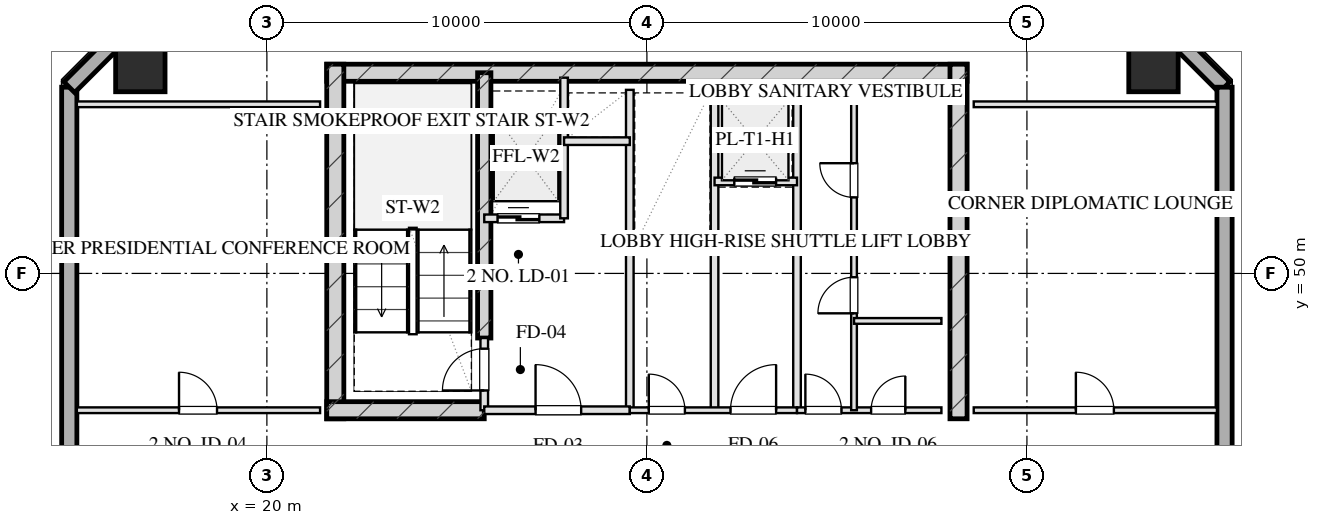
"""IFC4 building model, lengths in metres.
Left out: names, types, materials, properties, quantities, classifications, styles, units other than length and angle.
Written with IfcOpenShell. Run it as: python <this file> out.ifc"""

import sys

from ifc_helpers import new_model, si_unit, direction, frame, frame_2d, origin, origin_2d, place, context, subcontext, project, spatial, rectangle, hollow_rectangle, extrude, element, fill, save


model = new_model("IFC4")
c1 = context("Model", 3, precision=1e-05, world=origin(), true_north=direction((0.0, 1.0)))
c2 = subcontext(c1, "Body", "Model", "MODEL_VIEW")
j1 = project(units=[si_unit("LENGTHUNIT", "METRE"), si_unit("PLANEANGLEUNIT", "RADIAN")], contexts=[c1])
p1 = place(None, origin())
s1 = spatial("IfcSite", under=j1, at=p1, CompositionType="ELEMENT")
p2 = place(p1, origin())
s2 = spatial("IfcBuilding", under=s1, at=p2, CompositionType="ELEMENT")
p3 = place(p2, frame((0.0, 0.0, 237.6)))
s3 = spatial("IfcBuildingStorey", under=s2, at=p3, CompositionType="ELEMENT", Elevation=237.6)
p4 = place(p3, frame((21.575, 55.28, 0.0), z_axis=(0.0, 0.0, 1.0), x_axis=(1.0, 0.0, 0.0)))
e1 = element("IfcWall", 1, at=p4, inside=s3, PredefinedType="SHEAR", context=c2, shape_type="SweptSolid", body=[
    extrude(rectangle(XDim=16.85, YDim=0.45, at=frame_2d((8.425, 0.0))), origin(), (0.0, 0.0, 1.0), 3.2),
])
for number, where, z_axis, x_axis in (
    (2, (21.8, 46.175, 0.0), (0.0, 0.0, 1.0), (0.0, 1.0, 0.0)),
    (3, (38.2, 46.175, 0.0), (0.0, 0.0, 1.0), (0.0, 1.0, 0.0)),
):
    element("IfcWall", number, at=place(p3, frame(where, z_axis=z_axis, x_axis=x_axis)), inside=s3, PredefinedType="SHEAR", context=c2, shape_type="SweptSolid", body=[
        extrude(rectangle(XDim=9.33, YDim=0.45, at=frame_2d((4.665, 0.0))), origin(), (0.0, 0.0, 1.0), 3.2),
    ])
p5 = place(p3, frame((25.72, 48.3, 0.0), z_axis=(0.0, 0.0, 1.0), x_axis=(0.0, 1.0, 0.0)))
e4 = element("IfcWall", 4, at=p5, inside=s3, PredefinedType="SHEAR", context=c2, shape_type="SweptSolid", body=[
    extrude(rectangle(XDim=6.98, YDim=0.35, at=frame_2d((3.49, 0.0))), origin(), (0.0, 0.0, 1.0), 3.2),
])
p6 = place(p3, frame((21.575, 46.4, 0.0), z_axis=(0.0, 0.0, 1.0), x_axis=(1.0, 0.0, 0.0)))
e5 = element("IfcWall", 5, at=p6, inside=s3, PredefinedType="SHEAR", context=c2, shape_type="SweptSolid", body=[
    extrude(rectangle(XDim=4.145, YDim=0.45, at=frame_2d((2.073, 0.0))), origin(), (0.0, 0.0, 1.0), 3.2),
])
for number, where, z_axis, x_axis in (
    (6, (43.33, 55.43, 0.0), (0.0, 0.0, 1.0), (1.0, 0.0, 0.0)),
    (7, (16.67, 55.43, 0.0), (0.0, 0.0, 1.0), (1.0, 0.0, 0.0)),
):
    element("IfcColumn", number, at=place(p3, frame(where, z_axis=z_axis, x_axis=x_axis)), inside=s3, PredefinedType="COLUMN", context=c2, shape_type="SweptSolid", body=[
        extrude(hollow_rectangle(XDim=1.3, YDim=1.3, WallThickness=0.045, at=origin_2d()), origin(), (0.0, 0.0, 1.0), 3.201),
    ])
p7 = place(p3, frame((14.8, 13.1, 0.0), z_axis=(0.0, 0.0, 1.0), x_axis=(0.0, 1.0, 0.0)))
e8 = element("IfcWall", 8, at=p7, inside=s3, PredefinedType="SOLIDWALL", context=c2, shape_type="SweptSolid", body=[
    extrude(rectangle(XDim=41.8, YDim=0.4, at=frame_2d((20.9, 0.0))), origin(), (0.0, 0.0, 1.0), 2.36),
])
p8 = place(p7, frame((22.525, 0.0, 0.75)))
e9 = element("IfcOpeningElement", 9, at=p8, cuts=e8, PredefinedType="OPENING", context=c2, shape_type="SweptSolid", body=[
    extrude(rectangle(XDim=1.95, YDim=1.21, at=frame_2d((0.975, 0.605))), frame((0.0, 0.21, 0.0), z_axis=(0.0, -1.0, 0.0), x_axis=(1.0, 0.0, 0.0)), (0.0, 0.0, 1.0), 0.42),
])
p9 = place(p7, frame((26.325, 0.0, 0.75)))
e10 = element("IfcOpeningElement", 10, at=p9, cuts=e8, PredefinedType="OPENING", context=c2, shape_type="SweptSolid", body=[
    extrude(rectangle(XDim=1.95, YDim=1.21, at=frame_2d((0.975, 0.605))), frame((0.0, 0.21, 0.0), z_axis=(0.0, -1.0, 0.0), x_axis=(1.0, 0.0, 0.0)), (0.0, 0.0, 1.0), 0.42),
])
p10 = place(p7, frame((17.5, 0.0, 0.0)))
e11 = element("IfcOpeningElement", 11, at=p10, cuts=e8, PredefinedType="OPENING", context=c2, shape_type="SweptSolid", body=[
    extrude(rectangle(XDim=1.1, YDim=2.15, at=frame_2d((0.55, 1.075))), frame((0.0, 0.21, 0.0), z_axis=(0.0, -1.0, 0.0), x_axis=(1.0, 0.0, 0.0)), (0.0, 0.0, 1.0), 0.42),
])
for number, where, z_axis, x_axis in (
    (12, (14.8, 54.9, 0.0), (0.0, 0.0, 1.0), (0.707, 0.707, 0.0)),
    (13, (42.8, 57.3, 0.0), (0.0, 0.0, 1.0), (0.707, -0.707, 0.0)),
):
    element("IfcWall", number, at=place(p3, frame(where, z_axis=z_axis, x_axis=x_axis)), inside=s3, PredefinedType="SOLIDWALL", context=c2, shape_type="SweptSolid", body=[
        extrude(rectangle(XDim=3.394, YDim=0.4, at=frame_2d((1.697, 0.0))), origin(), (0.0, 0.0, 1.0), 2.36),
    ])
p11 = place(p3, frame((45.2, 54.9, 0.0), z_axis=(0.0, 0.0, 1.0), x_axis=(0.0, -1.0, 0.0)))
e14 = element("IfcWall", 14, at=p11, inside=s3, PredefinedType="SOLIDWALL", context=c2, shape_type="SweptSolid", body=[
    extrude(rectangle(XDim=41.8, YDim=0.4, at=frame_2d((20.9, 0.0))), origin(), (0.0, 0.0, 1.0), 2.36),
])
p12 = place(p11, frame((17.325, 0.0, 0.75)))
e15 = element("IfcOpeningElement", 15, at=p12, cuts=e14, PredefinedType="OPENING", context=c2, shape_type="SweptSolid", body=[
    extrude(rectangle(XDim=1.95, YDim=1.21, at=frame_2d((0.975, 0.605))), frame((0.0, 0.21, 0.0), z_axis=(0.0, -1.0, 0.0), x_axis=(1.0, 0.0, 0.0)), (0.0, 0.0, 1.0), 0.42),
])
p13 = place(p11, frame((13.525, 0.0, 0.75)))
e16 = element("IfcOpeningElement", 16, at=p13, cuts=e14, PredefinedType="OPENING", context=c2, shape_type="SweptSolid", body=[
    extrude(rectangle(XDim=1.95, YDim=1.21, at=frame_2d((0.975, 0.605))), frame((0.0, 0.21, 0.0), z_axis=(0.0, -1.0, 0.0), x_axis=(1.0, 0.0, 0.0)), (0.0, 0.0, 1.0), 0.42),
])
p14 = place(p11, frame((23.2, 0.0, 0.0)))
e17 = element("IfcOpeningElement", 17, at=p14, cuts=e14, PredefinedType="OPENING", context=c2, shape_type="SweptSolid", body=[
    extrude(rectangle(XDim=1.1, YDim=2.15, at=frame_2d((0.55, 1.075))), frame((0.0, 0.21, 0.0), z_axis=(0.0, -1.0, 0.0), x_axis=(1.0, 0.0, 0.0)), (0.0, 0.0, 1.0), 0.42),
])
p15 = place(p3, frame((25.72, 46.4, 0.0), z_axis=(0.0, 0.0, 1.0), x_axis=(0.0, 1.0, 0.0)))
e18 = element("IfcWall", 18, at=p15, inside=s3, PredefinedType="PARTITIONING", context=c2, shape_type="SweptSolid", body=[
    extrude(rectangle(XDim=1.9, YDim=0.2, at=frame_2d((0.95, 0.0))), origin(), (0.0, 0.0, 1.0), 2.925),
])
p16 = place(p15, frame((0.52, 0.0, 0.0)))
e19 = element("IfcOpeningElement", 19, at=p16, cuts=e18, PredefinedType="OPENING", context=c2, shape_type="SweptSolid", body=[
    extrude(rectangle(XDim=1.1, YDim=2.05, at=frame_2d((0.55, 1.025))), frame((0.0, 0.11, 0.0), z_axis=(0.0, -1.0, 0.0), x_axis=(1.0, 0.0, 0.0)), (0.0, 0.0, 1.0), 0.22),
])
p17 = place(p3, frame((29.55, 46.4, 0.0), z_axis=(0.0, 0.0, 1.0), x_axis=(0.0, 1.0, 0.0)))
e20 = element("IfcWall", 20, at=p17, inside=s3, PredefinedType="PARTITIONING", context=c2, shape_type="SweptSolid", body=[
    extrude(rectangle(XDim=8.43, YDim=0.2, at=frame_2d((4.215, 0.0))), origin(), (0.0, 0.0, 1.0), 2.925),
])
p18 = place(p3, frame((25.72, 46.4, 0.0), z_axis=(0.0, 0.0, 1.0), x_axis=(1.0, 0.0, 0.0)))
e21 = element("IfcWall", 21, at=p18, inside=s3, PredefinedType="PARTITIONING", context=c2, shape_type="SweptSolid", body=[
    extrude(rectangle(XDim=3.83, YDim=0.2, at=frame_2d((1.915, 0.0))), origin(), (0.0, 0.0, 1.0), 2.925),
])
p19 = place(p18, frame((1.35, 0.0, 0.0)))
e22 = element("IfcOpeningElement", 22, at=p19, cuts=e21, PredefinedType="OPENING", context=c2, shape_type="SweptSolid", body=[
    extrude(rectangle(XDim=1.2, YDim=2.05, at=frame_2d((0.6, 1.025))), frame((0.0, 0.11, 0.0), z_axis=(0.0, -1.0, 0.0), x_axis=(1.0, 0.0, 0.0)), (0.0, 0.0, 1.0), 0.22),
])
p20 = place(p3, frame((25.72, 51.45, 0.0), z_axis=(0.0, 0.0, 1.0), x_axis=(1.0, 0.0, 0.0)))
e23 = element("IfcWall", 23, at=p20, inside=s3, PredefinedType="PARTITIONING", context=c2, shape_type="SweptSolid", body=[
    extrude(rectangle(XDim=2.1, YDim=0.2, at=frame_2d((1.05, 0.0))), origin(), (0.0, 0.0, 1.0), 2.925),
])
p21 = place(p20, frame((0.35, 0.0, 0.0)))
e24 = element("IfcOpeningElement", 24, at=p21, cuts=e23, PredefinedType="OPENING", context=c2, shape_type="SweptSolid", body=[
    extrude(rectangle(XDim=1.1, YDim=2.05, at=frame_2d((0.55, 1.025))), frame((0.0, 0.11, 0.0), z_axis=(0.0, -1.0, 0.0), x_axis=(1.0, 0.0, 0.0)), (0.0, 0.0, 1.0), 0.22),
])
p22 = place(p3, frame((27.82, 51.45, 0.0), z_axis=(0.0, 0.0, 1.0), x_axis=(0.0, 1.0, 0.0)))
e25 = element("IfcWall", 25, at=p22, inside=s3, PredefinedType="PARTITIONING", context=c2, shape_type="SweptSolid", body=[
    extrude(rectangle(XDim=3.7, YDim=0.2, at=frame_2d((1.85, 0.0))), origin(), (0.0, 0.0, 1.0), 2.925),
])
p23 = place(p3, frame((27.82, 53.48, 0.0), z_axis=(0.0, 0.0, 1.0), x_axis=(1.0, 0.0, 0.0)))
e26 = element("IfcWall", 26, at=p23, inside=s3, PredefinedType="PARTITIONING", context=c2, shape_type="SweptSolid", body=[
    extrude(rectangle(XDim=1.73, YDim=0.2, at=frame_2d((0.865, 0.0))), origin(), (0.0, 0.0, 1.0), 2.925),
])
for number, where, z_axis, x_axis in (
    (27, (33.95, 46.4, 0.0), (0.0, 0.0, 1.0), (0.0, 1.0, 0.0)),
    (28, (31.78, 46.4, 0.0), (0.0, 0.0, 1.0), (0.0, 1.0, 0.0)),
):
    element("IfcWall", number, at=place(p3, frame(where, z_axis=z_axis, x_axis=x_axis)), inside=s3, PredefinedType="PARTITIONING", context=c2, shape_type="SweptSolid", body=[
        extrude(rectangle(XDim=8.43, YDim=0.2, at=frame_2d((4.215, 0.0))), origin(), (0.0, 0.0, 1.0), 2.925),
    ])
p24 = place(p3, frame((29.55, 46.4, 0.0), z_axis=(0.0, 0.0, 1.0), x_axis=(1.0, 0.0, 0.0)))
e29 = element("IfcWall", 29, at=p24, inside=s3, PredefinedType="PARTITIONING", context=c2, shape_type="SweptSolid", body=[
    extrude(rectangle(XDim=4.4, YDim=0.15, at=frame_2d((2.2, 0.0))), origin(), (0.0, 0.0, 1.0), 2.925),
])
p25 = place(p24, frame((0.5, 0.0, 0.0)))
e30 = element("IfcOpeningElement", 30, at=p25, cuts=e29, PredefinedType="OPENING", context=c2, shape_type="SweptSolid", body=[
    extrude(rectangle(XDim=0.95, YDim=2.05, at=frame_2d((0.475, 1.025))), frame((0.0, 0.085, 0.0), z_axis=(0.0, -1.0, 0.0), x_axis=(1.0, 0.0, 0.0)), (0.0, 0.0, 1.0), 0.17),
])
p26 = place(p24, frame((2.65, 0.0, 0.0)))
e31 = element("IfcOpeningElement", 31, at=p26, cuts=e29, PredefinedType="OPENING", context=c2, shape_type="SweptSolid", body=[
    extrude(rectangle(XDim=1.2, YDim=2.05, at=frame_2d((0.6, 1.025))), frame((0.0, 0.085, 0.0), z_axis=(0.0, -1.0, 0.0), x_axis=(1.0, 0.0, 0.0)), (0.0, 0.0, 1.0), 0.17),
])
p27 = place(p3, frame((29.55, 50.6, 0.0), z_axis=(0.0, 0.0, 1.0), x_axis=(1.0, 0.0, 0.0)))
e32 = element("IfcWall", 32, at=p27, inside=s3, PredefinedType="PARTITIONING", context=c2, shape_type="SweptSolid", body=[
    extrude(rectangle(XDim=2.23, YDim=0.15, at=frame_2d((1.115, 0.0))), origin(), (0.0, 0.0, 1.0), 2.925),
])
p28 = place(p3, frame((31.78, 52.42, 0.0), z_axis=(0.0, 0.0, 1.0), x_axis=(1.0, 0.0, 0.0)))
e33 = element("IfcWall", 33, at=p28, inside=s3, PredefinedType="PARTITIONING", context=c2, shape_type="SweptSolid", body=[
    extrude(rectangle(XDim=2.17, YDim=0.2, at=frame_2d((1.085, 0.0))), origin(), (0.0, 0.0, 1.0), 2.925),
])
p29 = place(p28, frame((0.52, 0.0, 0.0)))
e34 = element("IfcOpeningElement", 34, at=p29, cuts=e33, PredefinedType="OPENING", context=c2, shape_type="SweptSolid", body=[
    extrude(rectangle(XDim=1.1, YDim=2.05, at=frame_2d((0.55, 1.025))), frame((0.0, 0.11, 0.0), z_axis=(0.0, -1.0, 0.0), x_axis=(1.0, 0.0, 0.0)), (0.0, 0.0, 1.0), 0.22),
])
p30 = place(p3, frame((33.95, 46.4, 0.0), z_axis=(0.0, 0.0, 1.0), x_axis=(1.0, 0.0, 0.0)))
e35 = element("IfcWall", 35, at=p30, inside=s3, PredefinedType="PARTITIONING", context=c2, shape_type="SweptSolid", body=[
    extrude(rectangle(XDim=3.8, YDim=0.15, at=frame_2d((1.9, 0.0))), origin(), (0.0, 0.0, 1.0), 2.925),
])
p31 = place(p30, frame((0.22, 0.0, 0.0)))
e36 = element("IfcOpeningElement", 36, at=p31, cuts=e35, PredefinedType="OPENING", context=c2, shape_type="SweptSolid", body=[
    extrude(rectangle(XDim=0.95, YDim=2.05, at=frame_2d((0.475, 1.025))), frame((0.0, 0.085, 0.0), z_axis=(0.0, -1.0, 0.0), x_axis=(1.0, 0.0, 0.0)), (0.0, 0.0, 1.0), 0.17),
])
p32 = place(p30, frame((1.95, 0.0, 0.0)))
e37 = element("IfcOpeningElement", 37, at=p32, cuts=e35, PredefinedType="OPENING", context=c2, shape_type="SweptSolid", body=[
    extrude(rectangle(XDim=0.9, YDim=2.05, at=frame_2d((0.45, 1.025))), frame((0.0, 0.085, 0.0), z_axis=(0.0, -1.0, 0.0), x_axis=(1.0, 0.0, 0.0)), (0.0, 0.0, 1.0), 0.17),
])
p33 = place(p3, frame((35.45, 46.4, 0.0), z_axis=(0.0, 0.0, 1.0), x_axis=(0.0, 1.0, 0.0)))
e38 = element("IfcWall", 38, at=p33, inside=s3, PredefinedType="PARTITIONING", context=c2, shape_type="SweptSolid", body=[
    extrude(rectangle(XDim=8.43, YDim=0.15, at=frame_2d((4.215, 0.0))), origin(), (0.0, 0.0, 1.0), 2.515),
])
p34 = place(p33, frame((2.55, 0.0, 0.0)))
e39 = element("IfcOpeningElement", 39, at=p34, cuts=e38, PredefinedType="OPENING", context=c2, shape_type="SweptSolid", body=[
    extrude(rectangle(XDim=0.95, YDim=2.05, at=frame_2d((0.475, 1.025))), frame((0.0, 0.085, 0.0), z_axis=(0.0, -1.0, 0.0), x_axis=(1.0, 0.0, 0.0)), (0.0, 0.0, 1.0), 0.17),
])
p35 = place(p33, frame((5.6, 0.0, 0.0)))
e40 = element("IfcOpeningElement", 40, at=p35, cuts=e38, PredefinedType="OPENING", context=c2, shape_type="SweptSolid", body=[
    extrude(rectangle(XDim=0.9, YDim=2.05, at=frame_2d((0.45, 1.025))), frame((0.0, 0.085, 0.0), z_axis=(0.0, -1.0, 0.0), x_axis=(1.0, 0.0, 0.0)), (0.0, 0.0, 1.0), 0.17),
])
for number, where, z_axis, x_axis in (
    (41, (35.45, 50.8, 0.0), (0.0, 0.0, 1.0), (1.0, 0.0, 0.0)),
    (42, (35.45, 48.75, 0.0), (0.0, 0.0, 1.0), (1.0, 0.0, 0.0)),
):
    element("IfcWall", number, at=place(p3, frame(where, z_axis=z_axis, x_axis=x_axis)), inside=s3, PredefinedType="PARTITIONING", context=c2, shape_type="SweptSolid", body=[
        extrude(rectangle(XDim=2.3, YDim=0.15, at=frame_2d((1.15, 0.0))), origin(), (0.0, 0.0, 1.0), 2.925),
    ])
p36 = place(p3, frame((15.0, 54.45, 0.0), z_axis=(0.0, 0.0, 1.0), x_axis=(1.0, 0.0, 0.0)))
e43 = element("IfcWall", 43, at=p36, inside=s3, PredefinedType="PARTITIONING", context=c2, shape_type="SweptSolid", body=[
    extrude(rectangle(XDim=6.4, YDim=0.15, at=frame_2d((3.2, 0.0))), origin(), (0.0, 0.0, 1.0), 2.925),
])
p37 = place(p3, frame((15.0, 46.4, 0.0), z_axis=(0.0, 0.0, 1.0), x_axis=(1.0, 0.0, 0.0)))
e44 = element("IfcWall", 44, at=p37, inside=s3, PredefinedType="PARTITIONING", context=c2, shape_type="SweptSolid", body=[
    extrude(rectangle(XDim=6.4, YDim=0.15, at=frame_2d((3.2, 0.0))), origin(), (0.0, 0.0, 1.0), 2.925),
])
p38 = place(p37, frame((2.688, 0.0, 0.0)))
e45 = element("IfcOpeningElement", 45, at=p38, cuts=e44, PredefinedType="OPENING", context=c2, shape_type="SweptSolid", body=[
    extrude(rectangle(XDim=1.0, YDim=2.05, at=frame_2d((0.5, 1.025))), frame((0.0, 0.085, 0.0), z_axis=(0.0, -1.0, 0.0), x_axis=(1.0, 0.0, 0.0)), (0.0, 0.0, 1.0), 0.17),
])
p39 = place(p3, frame((38.6, 54.45, 0.0), z_axis=(0.0, 0.0, 1.0), x_axis=(1.0, 0.0, 0.0)))
e46 = element("IfcWall", 46, at=p39, inside=s3, PredefinedType="PARTITIONING", context=c2, shape_type="SweptSolid", body=[
    extrude(rectangle(XDim=6.4, YDim=0.15, at=frame_2d((3.2, 0.0))), origin(), (0.0, 0.0, 1.0), 2.925),
])
p40 = place(p3, frame((38.6, 46.4, 0.0), z_axis=(0.0, 0.0, 1.0), x_axis=(1.0, 0.0, 0.0)))
e47 = element("IfcWall", 47, at=p40, inside=s3, PredefinedType="PARTITIONING", context=c2, shape_type="SweptSolid", body=[
    extrude(rectangle(XDim=6.4, YDim=0.15, at=frame_2d((3.2, 0.0))), origin(), (0.0, 0.0, 1.0), 2.925),
])
p41 = place(p40, frame((2.688, 0.0, 0.0)))
e48 = element("IfcOpeningElement", 48, at=p41, cuts=e47, PredefinedType="OPENING", context=c2, shape_type="SweptSolid", body=[
    extrude(rectangle(XDim=1.0, YDim=2.05, at=frame_2d((0.5, 1.025))), frame((0.0, 0.085, 0.0), z_axis=(0.0, -1.0, 0.0), x_axis=(1.0, 0.0, 0.0)), (0.0, 0.0, 1.0), 0.17),
])
p42 = place(p16, origin())
e49 = element("IfcDoor", 49, at=p42, inside=s3, OperationType="SINGLE_SWING_LEFT", PredefinedType="DOOR", context=c2, shape_type="SweptSolid", body=[
    extrude(rectangle(XDim=1.1, YDim=2.05, at=frame_2d((0.55, 1.025))), frame((0.0, 0.025, 0.0), z_axis=(0.0, -1.0, 0.0), x_axis=(1.0, 0.0, 0.0)), (0.0, 0.0, 1.0), 0.05),
])
fill(e19, e49)
p43 = place(p19, origin())
e50 = element("IfcDoor", 50, at=p43, inside=s3, OperationType="SINGLE_SWING_LEFT", PredefinedType="DOOR", context=c2, shape_type="SweptSolid", body=[
    extrude(rectangle(XDim=1.2, YDim=2.05, at=frame_2d((0.6, 1.025))), frame((0.0, 0.025, 0.0), z_axis=(0.0, -1.0, 0.0), x_axis=(1.0, 0.0, 0.0)), (0.0, 0.0, 1.0), 0.05),
])
fill(e22, e50)
p44 = place(p21, origin())
e51 = element("IfcDoor", 51, at=p44, inside=s3, OperationType="DOUBLE_DOOR_SLIDING", PredefinedType="DOOR", context=c2, shape_type="SweptSolid", body=[
    extrude(rectangle(XDim=1.1, YDim=2.05, at=frame_2d((0.55, 1.025))), frame((0.0, 0.025, 0.0), z_axis=(0.0, -1.0, 0.0), x_axis=(1.0, 0.0, 0.0)), (0.0, 0.0, 1.0), 0.05),
])
fill(e24, e51)
p45 = place(p25, origin())
e52 = element("IfcDoor", 52, at=p45, inside=s3, OperationType="SINGLE_SWING_LEFT", PredefinedType="DOOR", context=c2, shape_type="SweptSolid", body=[
    extrude(rectangle(XDim=0.95, YDim=2.05, at=frame_2d((0.475, 1.025))), frame((0.0, 0.025, 0.0), z_axis=(0.0, -1.0, 0.0), x_axis=(1.0, 0.0, 0.0)), (0.0, 0.0, 1.0), 0.05),
])
fill(e30, e52)
p46 = place(p26, origin())
e53 = element("IfcDoor", 53, at=p46, inside=s3, OperationType="SINGLE_SWING_RIGHT", PredefinedType="DOOR", context=c2, shape_type="SweptSolid", body=[
    extrude(rectangle(XDim=1.2, YDim=2.05, at=frame_2d((0.6, 1.025))), frame((0.0, 0.025, 0.0), z_axis=(0.0, -1.0, 0.0), x_axis=(1.0, 0.0, 0.0)), (0.0, 0.0, 1.0), 0.05),
])
fill(e31, e53)
p47 = place(p29, origin())
e54 = element("IfcDoor", 54, at=p47, inside=s3, OperationType="DOUBLE_DOOR_SLIDING", PredefinedType="DOOR", context=c2, shape_type="SweptSolid", body=[
    extrude(rectangle(XDim=1.1, YDim=2.05, at=frame_2d((0.55, 1.025))), frame((0.0, 0.025, 0.0), z_axis=(0.0, -1.0, 0.0), x_axis=(1.0, 0.0, 0.0)), (0.0, 0.0, 1.0), 0.05),
])
fill(e34, e54)
p48 = place(p31, origin())
e55 = element("IfcDoor", 55, at=p48, inside=s3, OperationType="SINGLE_SWING_LEFT", PredefinedType="DOOR", context=c2, shape_type="SweptSolid", body=[
    extrude(rectangle(XDim=0.95, YDim=2.05, at=frame_2d((0.475, 1.025))), frame((0.0, 0.025, 0.0), z_axis=(0.0, -1.0, 0.0), x_axis=(1.0, 0.0, 0.0)), (0.0, 0.0, 1.0), 0.05),
])
fill(e36, e55)
p49 = place(p32, origin())
e56 = element("IfcDoor", 56, at=p49, inside=s3, OperationType="SINGLE_SWING_RIGHT", PredefinedType="DOOR", context=c2, shape_type="SweptSolid", body=[
    extrude(rectangle(XDim=0.9, YDim=2.05, at=frame_2d((0.45, 1.025))), frame((0.0, 0.025, 0.0), z_axis=(0.0, -1.0, 0.0), x_axis=(1.0, 0.0, 0.0)), (0.0, 0.0, 1.0), 0.05),
])
fill(e37, e56)
p50 = place(p34, origin())
e57 = element("IfcDoor", 57, at=p50, inside=s3, OperationType="SINGLE_SWING_LEFT", PredefinedType="DOOR", context=c2, shape_type="SweptSolid", body=[
    extrude(rectangle(XDim=0.95, YDim=2.05, at=frame_2d((0.475, 1.025))), frame((0.0, 0.025, 0.0), z_axis=(0.0, -1.0, 0.0), x_axis=(1.0, 0.0, 0.0)), (0.0, 0.0, 1.0), 0.05),
])
fill(e39, e57)
p51 = place(p35, origin())
e58 = element("IfcDoor", 58, at=p51, inside=s3, OperationType="SINGLE_SWING_RIGHT", PredefinedType="DOOR", context=c2, shape_type="SweptSolid", body=[
    extrude(rectangle(XDim=0.9, YDim=2.05, at=frame_2d((0.45, 1.025))), frame((0.0, 0.025, 0.0), z_axis=(0.0, -1.0, 0.0), x_axis=(1.0, 0.0, 0.0)), (0.0, 0.0, 1.0), 0.05),
])
fill(e40, e58)
p52 = place(p38, origin())
e59 = element("IfcDoor", 59, at=p52, inside=s3, OperationType="SINGLE_SWING_LEFT", PredefinedType="DOOR", context=c2, shape_type="SweptSolid", body=[
    extrude(rectangle(XDim=1.0, YDim=2.05, at=frame_2d((0.5, 1.025))), frame((0.0, 0.025, 0.0), z_axis=(0.0, -1.0, 0.0), x_axis=(1.0, 0.0, 0.0)), (0.0, 0.0, 1.0), 0.05),
])
fill(e45, e59)
p53 = place(p41, origin())
e60 = element("IfcDoor", 60, at=p53, inside=s3, OperationType="SINGLE_SWING_LEFT", PredefinedType="DOOR", context=c2, shape_type="SweptSolid", body=[
    extrude(rectangle(XDim=1.0, YDim=2.05, at=frame_2d((0.5, 1.025))), frame((0.0, 0.025, 0.0), z_axis=(0.0, -1.0, 0.0), x_axis=(1.0, 0.0, 0.0)), (0.0, 0.0, 1.0), 0.05),
])
fill(e48, e60)
save(model, sys.argv[1])
